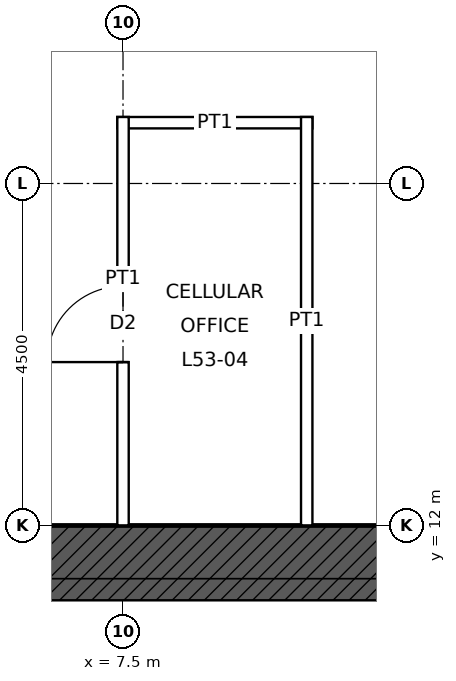
"""IFC4 building model, lengths in metres.
Left out: names, types, materials, properties, quantities, classifications, styles, units other than length and angle.
Written with IfcOpenShell. Run it as: python <this file> out.ifc"""

import sys

from ifc_helpers import new_model, si_unit, direction, frame, frame_2d, origin, place, context, subcontext, project, spatial, rectangle, extrude, element, fill, save


model = new_model("IFC4")
c1 = context("Model", 3, precision=1e-05, world=origin(), true_north=direction((0.0, 1.0)))
c2 = subcontext(c1, "Body", "Model", "MODEL_VIEW")
j1 = project(units=[si_unit("LENGTHUNIT", "METRE"), si_unit("PLANEANGLEUNIT", "RADIAN")], contexts=[c1])
p1 = place(None, origin())
s1 = spatial("IfcSite", under=j1, at=p1, CompositionType="ELEMENT")
p2 = place(p1, origin())
s2 = spatial("IfcBuilding", under=s1, at=p2, CompositionType="ELEMENT")
p3 = place(p2, frame((0.0, 0.0, 245.9)))
s3 = spatial("IfcBuildingStorey", under=s2, at=p3, CompositionType="ELEMENT", Elevation=245.9)
p4 = place(p3, frame((-12.0, 11.5, 0.0), z_axis=(0.0, 0.0, 1.0), x_axis=(1.0, 0.0, 0.0)))
e1 = element("IfcWall", 1, at=p4, inside=s3, PredefinedType="SHEAR", context=c2, shape_type="SweptSolid", body=[
    extrude(rectangle(XDim=24.0, YDim=1.0, at=frame_2d((12.0, 0.0))), origin(), (0.0, 0.0, 1.0), 4.0),
])
p5 = place(p4, frame((6.25, 0.0, 0.0)))
e2 = element("IfcOpeningElement", 2, at=p5, cuts=e1, PredefinedType="OPENING", context=c2, shape_type="SweptSolid", body=[
    extrude(rectangle(XDim=1.0, YDim=2.4, at=frame_2d((0.5, 1.2))), frame((0.0, 0.51, 0.0), z_axis=(0.0, -1.0, 0.0), x_axis=(1.0, 0.0, 0.0)), (0.0, 0.0, 1.0), 1.02),
])
p6 = place(p4, frame((16.75, 0.0, 0.0)))
e3 = element("IfcOpeningElement", 3, at=p6, cuts=e1, PredefinedType="OPENING", context=c2, shape_type="SweptSolid", body=[
    extrude(rectangle(XDim=1.0, YDim=2.4, at=frame_2d((0.5, 1.2))), frame((0.0, 0.51, 0.0), z_axis=(0.0, -1.0, 0.0), x_axis=(1.0, 0.0, 0.0)), (0.0, 0.0, 1.0), 1.02),
])
p7 = place(p3, frame((7.425, 17.3, 0.0), z_axis=(0.0, 0.0, 1.0), x_axis=(1.0, 0.0, 0.0)))
e4 = element("IfcWall", 4, at=p7, inside=s3, PredefinedType="PARTITIONING", context=c2, shape_type="SweptSolid", body=[
    extrude(rectangle(XDim=2.567, YDim=0.15, at=frame_2d((1.283, 0.0))), origin(), (0.0, 0.0, 1.0), 3.85),
])
p8 = place(p3, frame((7.5, 12.0, 0.0), z_axis=(0.0, 0.0, 1.0), x_axis=(0.0, 1.0, 0.0)))
e5 = element("IfcWall", 5, at=p8, inside=s3, PredefinedType="PARTITIONING", context=c2, shape_type="SweptSolid", body=[
    extrude(rectangle(XDim=5.375, YDim=0.15, at=frame_2d((2.688, 0.0))), origin(), (0.0, 0.0, 1.0), 3.238),
])
p9 = place(p8, frame((2.15, 0.0, 0.0)))
e6 = element("IfcOpeningElement", 6, at=p9, cuts=e5, PredefinedType="OPENING", context=c2, shape_type="SweptSolid", body=[
    extrude(rectangle(XDim=1.0, YDim=2.1, at=frame_2d((0.5, 1.05))), frame((0.0, 0.085, 0.0), z_axis=(0.0, -1.0, 0.0), x_axis=(1.0, 0.0, 0.0)), (0.0, 0.0, 1.0), 0.17),
])
p10 = place(p3, frame((9.917, 12.0, 0.0), z_axis=(0.0, 0.0, 1.0), x_axis=(0.0, 1.0, 0.0)))
e7 = element("IfcWall", 7, at=p10, inside=s3, PredefinedType="PARTITIONING", context=c2, shape_type="SweptSolid", body=[
    extrude(rectangle(XDim=5.375, YDim=0.15, at=frame_2d((2.688, 0.0))), origin(), (0.0, 0.0, 1.0), 3.85),
])
p11 = place(p9, origin())
e8 = element("IfcDoor", 8, at=p11, inside=s3, OperationType="SINGLE_SWING_LEFT", PredefinedType="DOOR", context=c2, shape_type="SweptSolid", body=[
    extrude(rectangle(XDim=1.0, YDim=2.1, at=frame_2d((0.5, 1.05))), frame((0.0, 0.025, 0.0), z_axis=(0.0, -1.0, 0.0), x_axis=(1.0, 0.0, 0.0)), (0.0, 0.0, 1.0), 0.05),
])
fill(e6, e8)
save(model, sys.argv[1])
